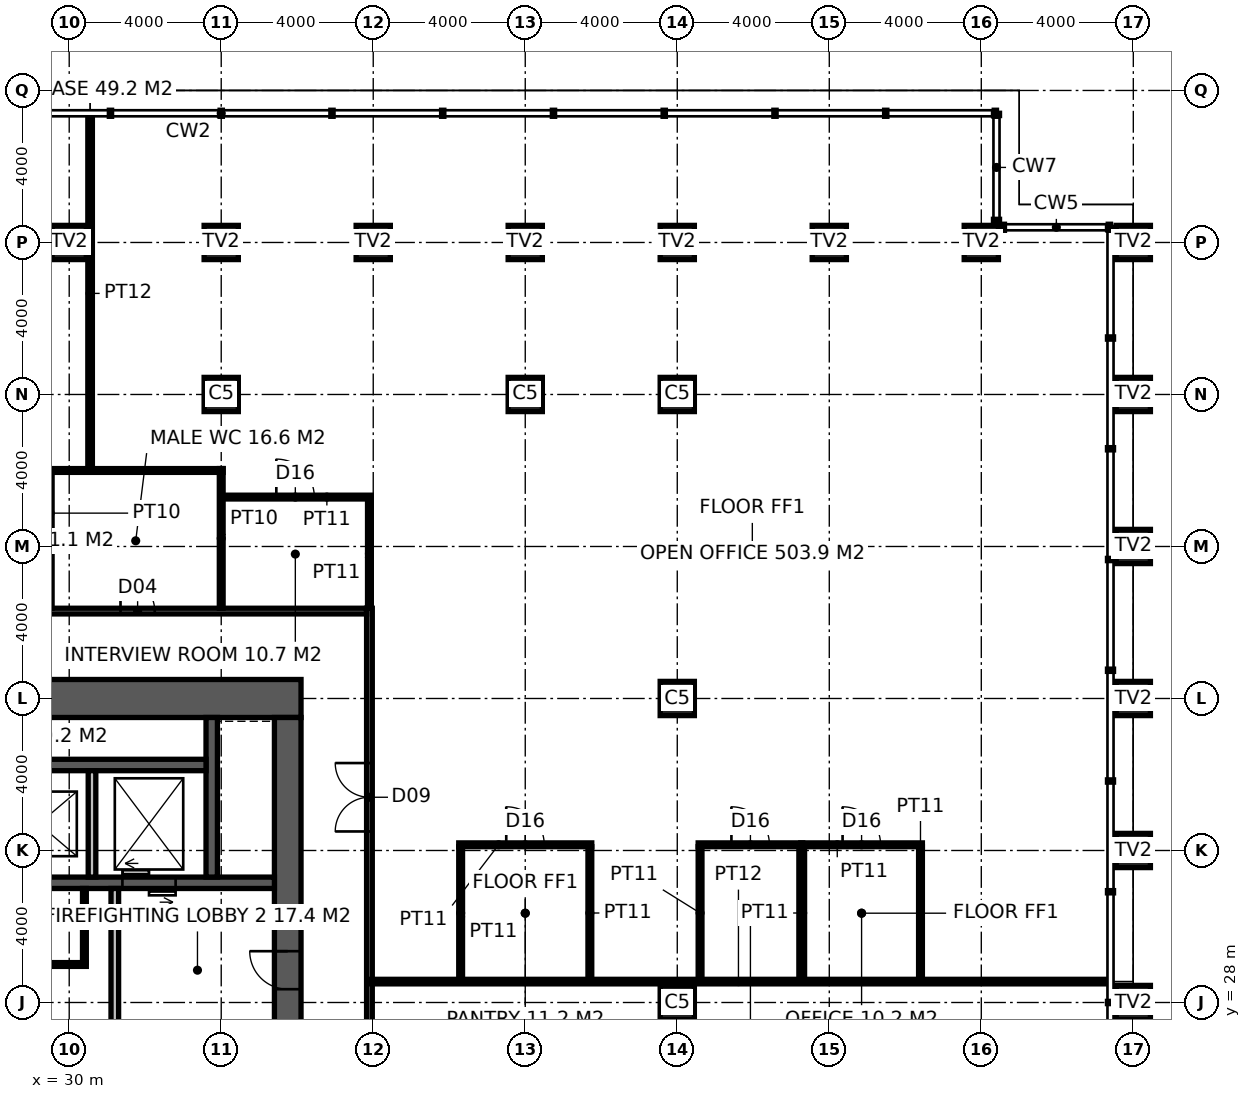
"""IFC4 building model, lengths in metres.
Left out: names, types, materials, properties, quantities, classifications, styles, units other than length and angle.
Written with IfcOpenShell. Run it as: python <this file> out.ifc"""

import sys

from ifc_helpers import new_model, si_unit, direction, frame, frame_2d, origin, origin_2d, place, context, subcontext, project, spatial, rectangle, hollow_rectangle, extrude, element, fill, save


model = new_model("IFC4")
c1 = context("Model", 3, precision=1e-05, world=origin(), true_north=direction((0.0, 1.0)))
c2 = subcontext(c1, "Body", "Model", "MODEL_VIEW")
j1 = project(units=[si_unit("LENGTHUNIT", "METRE"), si_unit("PLANEANGLEUNIT", "RADIAN")], contexts=[c1])
p1 = place(None, origin())
s1 = spatial("IfcSite", under=j1, at=p1, CompositionType="ELEMENT")
p2 = place(p1, origin())
s2 = spatial("IfcBuilding", under=s1, at=p2, CompositionType="ELEMENT")
p3 = place(p2, frame((0.0, 0.0, 105.4)))
s3 = spatial("IfcBuildingStorey", under=s2, at=p3, CompositionType="ELEMENT", Elevation=105.4)
for number, where, z_axis, x_axis in (
    (1, (58.0, 28.0, 0.0), (0.0, 0.0, 1.0), (1.0, 0.0, 0.0)),
    (2, (58.0, 32.0, 0.0), (0.0, 0.0, 1.0), (1.0, 0.0, 0.0)),
    (3, (58.0, 36.0, 0.0), (0.0, 0.0, 1.0), (1.0, 0.0, 0.0)),
    (4, (58.0, 40.0, 0.0), (0.0, 0.0, 1.0), (1.0, 0.0, 0.0)),
    (5, (58.0, 44.0, 0.0), (0.0, 0.0, 1.0), (1.0, 0.0, 0.0)),
    (6, (58.0, 48.0, 0.0), (0.0, 0.0, 1.0), (1.0, 0.0, 0.0)),
    (7, (30.0, 48.0, 0.0), (0.0, 0.0, 1.0), (1.0, 0.0, 0.0)),
    (8, (34.0, 48.0, 0.0), (0.0, 0.0, 1.0), (1.0, 0.0, 0.0)),
    (9, (38.0, 48.0, 0.0), (0.0, 0.0, 1.0), (1.0, 0.0, 0.0)),
    (10, (42.0, 48.0, 0.0), (0.0, 0.0, 1.0), (1.0, 0.0, 0.0)),
    (11, (46.0, 48.0, 0.0), (0.0, 0.0, 1.0), (1.0, 0.0, 0.0)),
    (12, (50.0, 48.0, 0.0), (0.0, 0.0, 1.0), (1.0, 0.0, 0.0)),
    (13, (54.0, 48.0, 0.0), (0.0, 0.0, 1.0), (1.0, 0.0, 0.0)),
):
    element("IfcColumn", number, at=place(p3, frame(where, z_axis=z_axis, x_axis=x_axis)), inside=s3, PredefinedType="USERDEFINED", context=c2, shape_type="SweptSolid", body=[
        extrude(hollow_rectangle(XDim=0.9, YDim=0.9, WallThickness=0.1, at=origin_2d()), origin(), (0.0, 0.0, 1.0), 4.0),
    ])
for number, where, z_axis, x_axis in (
    (14, (34.0, 44.0, 0.0), (0.0, 0.0, 1.0), (1.0, 0.0, 0.0)),
    (15, (42.0, 44.0, 0.0), (0.0, 0.0, 1.0), (1.0, 0.0, 0.0)),
    (16, (46.0, 28.0, 0.0), (0.0, 0.0, 1.0), (1.0, 0.0, 0.0)),
    (17, (46.0, 36.0, 0.0), (0.0, 0.0, 1.0), (1.0, 0.0, 0.0)),
    (18, (46.0, 44.0, 0.0), (0.0, 0.0, 1.0), (1.0, 0.0, 0.0)),
):
    element("IfcColumn", number, at=place(p3, frame(where, z_axis=z_axis, x_axis=x_axis)), inside=s3, PredefinedType="COLUMN", context=c2, shape_type="SweptSolid", body=[
        extrude(hollow_rectangle(XDim=0.9, YDim=0.9, WallThickness=0.1, at=origin_2d()), origin(), (0.0, 0.0, 1.0), 4.0),
    ])
p4 = place(p3, frame((18.5, 36.0, -0.15), z_axis=(0.0, 0.0, 1.0), x_axis=(1.0, 0.0, 0.0)))
e19 = element("IfcWall", 19, at=p4, inside=s3, PredefinedType="SHEAR", context=c2, shape_type="SweptSolid", body=[
    extrude(rectangle(XDim=17.6, YDim=1.0, at=frame_2d((8.8, 0.0))), origin(), (0.0, 0.0, 1.0), 4.0),
])
p5 = place(p3, frame((35.75, 18.5, -0.15), z_axis=(0.0, 0.0, 1.0), x_axis=(0.0, 1.0, 0.0)))
e20 = element("IfcWall", 20, at=p5, inside=s3, PredefinedType="SHEAR", context=c2, shape_type="SweptSolid", body=[
    extrude(rectangle(XDim=17.0, YDim=0.7, at=frame_2d((8.5, 0.0))), origin(), (0.0, 0.0, 1.0), 4.0),
])
p6 = place(p5, frame((9.85, 0.0, 0.15)))
e21 = element("IfcOpeningElement", 21, at=p6, cuts=e20, PredefinedType="OPENING", context=c2, shape_type="SweptSolid", body=[
    extrude(rectangle(XDim=1.0, YDim=2.2, at=frame_2d((0.5, 1.1))), frame((0.0, 0.36, 0.0), z_axis=(0.0, -1.0, 0.0), x_axis=(1.0, 0.0, 0.0)), (0.0, 0.0, 1.0), 0.72),
])
p7 = place(p3, frame((24.15, 31.15, -0.15), z_axis=(0.0, 0.0, 1.0), x_axis=(1.0, 0.0, 0.0)))
e22 = element("IfcWall", 22, at=p7, inside=s3, PredefinedType="SHEAR", context=c2, shape_type="SweptSolid", body=[
    extrude(rectangle(XDim=11.25, YDim=0.3, at=frame_2d((5.625, 0.0))), origin(), (0.0, 0.0, 1.0), 4.0),
])
p8 = place(p7, frame((7.25, 0.0, 0.15)))
e23 = element("IfcOpeningElement", 23, at=p8, cuts=e22, PredefinedType="OPENING", context=c2, shape_type="SweptSolid", body=[
    extrude(rectangle(XDim=1.4, YDim=2.4, at=frame_2d((0.7, 1.2))), frame((0.0, 0.16, 0.0), z_axis=(0.0, -1.0, 0.0), x_axis=(1.0, 0.0, 0.0)), (0.0, 0.0, 1.0), 0.32),
])
p9 = place(p3, frame((33.75, 31.3, -0.15), z_axis=(0.0, 0.0, 1.0), x_axis=(0.0, 1.0, 0.0)))
e24 = element("IfcWall", 24, at=p9, inside=s3, PredefinedType="SHEAR", context=c2, shape_type="SweptSolid", body=[
    extrude(rectangle(XDim=4.2, YDim=0.3, at=frame_2d((2.1, 0.0))), origin(), (0.0, 0.0, 1.0), 4.0),
])
p10 = place(p3, frame((25.0, 34.25, -0.15), z_axis=(0.0, 0.0, 1.0), x_axis=(1.0, 0.0, 0.0)))
e25 = element("IfcWall", 25, at=p10, inside=s3, PredefinedType="SHEAR", context=c2, shape_type="SweptSolid", body=[
    extrude(rectangle(XDim=8.6, YDim=0.3, at=frame_2d((4.3, 0.0))), origin(), (0.0, 0.0, 1.0), 4.0),
])
p11 = place(p3, frame((30.6, 31.3, -0.15), z_axis=(0.0, 0.0, 1.0), x_axis=(0.0, 1.0, 0.0)))
e26 = element("IfcWall", 26, at=p11, inside=s3, PredefinedType="SOLIDWALL", context=c2, shape_type="SweptSolid", body=[
    extrude(rectangle(XDim=2.8, YDim=0.2, at=frame_2d((1.4, 0.0))), origin(), (0.0, 0.0, 1.0), 4.0),
])
p12 = place(p3, frame((31.2, 26.7, 0.0), z_axis=(0.0, 0.0, 1.0), x_axis=(0.0, 1.0, 0.0)))
e27 = element("IfcWall", 27, at=p12, inside=s3, PredefinedType="SOLIDWALL", context=c2, shape_type="SweptSolid", body=[
    extrude(rectangle(XDim=4.3, YDim=0.2, at=frame_2d((2.15, 0.0))), origin(), (0.0, 0.0, 1.0), 3.85),
])
p13 = place(p3, frame((25.75, 29.0, 0.0), z_axis=(0.0, 0.0, 1.0), x_axis=(1.0, 0.0, 0.0)))
e28 = element("IfcWall", 28, at=p13, inside=s3, PredefinedType="PARTITIONING", context=c2, shape_type="SweptSolid", body=[
    extrude(rectangle(XDim=4.7, YDim=0.1, at=frame_2d((2.35, 0.0))), origin(), (0.0, 0.0, 1.0), 3.85),
])
p14 = place(p13, frame((1.85, 0.0, 0.0)))
e29 = element("IfcOpeningElement", 29, at=p14, cuts=e28, PredefinedType="OPENING", context=c2, shape_type="SweptSolid", body=[
    extrude(rectangle(XDim=1.0, YDim=2.2, at=frame_2d((0.5, 1.1))), frame((0.0, 0.06, 0.0), z_axis=(0.0, -1.0, 0.0), x_axis=(1.0, 0.0, 0.0)), (0.0, 0.0, 1.0), 0.12),
])
p15 = place(p3, frame((30.4, 29.05, 0.0), z_axis=(0.0, 0.0, 1.0), x_axis=(0.0, 1.0, 0.0)))
e30 = element("IfcWall", 30, at=p15, inside=s3, PredefinedType="PARTITIONING", context=c2, shape_type="SweptSolid", body=[
    extrude(rectangle(XDim=1.95, YDim=0.1, at=frame_2d((0.975, 0.0))), origin(), (0.0, 0.0, 1.0), 3.85),
])
p16 = place(p3, frame((37.9, 15.625, 0.0), z_axis=(0.0, 0.0, 1.0), x_axis=(0.0, 1.0, 0.0)))
e31 = element("IfcWall", 31, at=p16, inside=s3, PredefinedType="PARTITIONING", context=c2, shape_type="SweptSolid", body=[
    extrude(rectangle(XDim=22.75, YDim=0.15, at=frame_2d((11.375, 0.0))), origin(), (0.0, 0.0, 1.0), 2.65),
])
p17 = place(p16, frame((3.074, 0.0, 0.0)))
e32 = element("IfcOpeningElement", 32, at=p17, cuts=e31, PredefinedType="OPENING", context=c2, shape_type="SweptSolid", body=[
    extrude(rectangle(XDim=1.8, YDim=2.4, at=frame_2d((0.9, 1.2))), frame((0.0, 0.085, 0.0), z_axis=(0.0, -1.0, 0.0), x_axis=(1.0, 0.0, 0.0)), (0.0, 0.0, 1.0), 0.17),
])
p18 = place(p16, frame((16.876, 0.0, 0.0)))
e33 = element("IfcOpeningElement", 33, at=p18, cuts=e31, PredefinedType="OPENING", context=c2, shape_type="SweptSolid", body=[
    extrude(rectangle(XDim=1.8, YDim=2.4, at=frame_2d((0.9, 1.2))), frame((0.0, 0.085, 0.0), z_axis=(0.0, -1.0, 0.0), x_axis=(1.0, 0.0, 0.0)), (0.0, 0.0, 1.0), 0.17),
])
p19 = place(p16, frame((9.875, 0.0, 0.0)))
e34 = element("IfcOpeningElement", 34, at=p19, cuts=e31, PredefinedType="OPENING", context=c2, shape_type="SweptSolid", body=[
    extrude(rectangle(XDim=1.0, YDim=2.2, at=frame_2d((0.5, 1.1))), frame((0.0, 0.085, 0.0), z_axis=(0.0, -1.0, 0.0), x_axis=(1.0, 0.0, 0.0)), (0.0, 0.0, 1.0), 0.17),
])
p20 = place(p3, frame((15.175, 38.3, 0.0), z_axis=(0.0, 0.0, 1.0), x_axis=(1.0, 0.0, 0.0)))
e35 = element("IfcWall", 35, at=p20, inside=s3, PredefinedType="PARTITIONING", context=c2, shape_type="SweptSolid", body=[
    extrude(rectangle(XDim=22.65, YDim=0.15, at=frame_2d((11.325, 0.0))), origin(), (0.0, 0.0, 1.0), 3.85),
])
p21 = place(p20, frame((8.575, 0.0, 0.0)))
e36 = element("IfcOpeningElement", 36, at=p21, cuts=e35, PredefinedType="OPENING", context=c2, shape_type="SweptSolid", body=[
    extrude(rectangle(XDim=0.9, YDim=2.1, at=frame_2d((0.45, 1.05))), frame((0.0, 0.085, 0.0), z_axis=(0.0, -1.0, 0.0), x_axis=(1.0, 0.0, 0.0)), (0.0, 0.0, 1.0), 0.17),
])
p22 = place(p20, frame((12.325, 0.0, 0.0)))
e37 = element("IfcOpeningElement", 37, at=p22, cuts=e35, PredefinedType="OPENING", context=c2, shape_type="SweptSolid", body=[
    extrude(rectangle(XDim=1.0, YDim=2.1, at=frame_2d((0.5, 1.05))), frame((0.0, 0.085, 0.0), z_axis=(0.0, -1.0, 0.0), x_axis=(1.0, 0.0, 0.0)), (0.0, 0.0, 1.0), 0.17),
])
p23 = place(p20, frame((16.175, 0.0, 0.0)))
e38 = element("IfcOpeningElement", 38, at=p23, cuts=e35, PredefinedType="OPENING", context=c2, shape_type="SweptSolid", body=[
    extrude(rectangle(XDim=0.9, YDim=2.1, at=frame_2d((0.45, 1.05))), frame((0.0, 0.085, 0.0), z_axis=(0.0, -1.0, 0.0), x_axis=(1.0, 0.0, 0.0)), (0.0, 0.0, 1.0), 0.17),
])
p24 = place(p3, frame((34.0, 38.375, 0.0), z_axis=(0.0, 0.0, 1.0), x_axis=(0.0, 1.0, 0.0)))
e39 = element("IfcWall", 39, at=p24, inside=s3, PredefinedType="PARTITIONING", context=c2, shape_type="SweptSolid", body=[
    extrude(rectangle(XDim=3.675, YDim=0.1, at=frame_2d((1.837, 0.0))), origin(), (0.0, 0.0, 1.0), 2.95),
])
p25 = place(p3, frame((21.95, 42.0, 0.0), z_axis=(0.0, 0.0, 1.0), x_axis=(1.0, 0.0, 0.0)))
e40 = element("IfcWall", 40, at=p25, inside=s3, PredefinedType="PARTITIONING", context=c2, shape_type="SweptSolid", body=[
    extrude(rectangle(XDim=12.1, YDim=0.1, at=frame_2d((6.05, 0.0))), origin(), (0.0, 0.0, 1.0), 3.85),
])
p26 = place(p3, frame((37.9, 28.55, 0.0), z_axis=(0.0, 0.0, 1.0), x_axis=(1.0, 0.0, 0.0)))
e41 = element("IfcWall", 41, at=p26, inside=s3, PredefinedType="PARTITIONING", context=c2, shape_type="SweptSolid", body=[
    extrude(rectangle(XDim=19.42, YDim=0.12, at=frame_2d((9.71, 0.0))), origin(), (0.0, 0.0, 1.0), 2.65),
])
p27 = place(p3, frame((30.55, 42.0, 0.0), z_axis=(0.0, 0.0, 1.0), x_axis=(0.0, 1.0, 0.0)))
e42 = element("IfcWall", 42, at=p27, inside=s3, PredefinedType="PARTITIONING", context=c2, shape_type="SweptSolid", body=[
    extrude(rectangle(XDim=9.32, YDim=0.12, at=frame_2d((4.66, 0.0))), origin(), (0.0, 0.0, 1.0), 3.85),
])
p28 = place(p3, frame((40.25, 32.15, 0.0), z_axis=(0.0, 0.0, 1.0), x_axis=(1.0, 0.0, 0.0)))
e43 = element("IfcWall", 43, at=p28, inside=s3, PredefinedType="PARTITIONING", context=c2, shape_type="SweptSolid", body=[
    extrude(rectangle(XDim=3.5, YDim=0.1, at=frame_2d((1.75, 0.0))), origin(), (0.0, 0.0, 1.0), 2.85),
])
p29 = place(p28, frame((1.25, 0.0, 0.0)))
e44 = element("IfcOpeningElement", 44, at=p29, cuts=e43, PredefinedType="OPENING", context=c2, shape_type="SweptSolid", body=[
    extrude(rectangle(XDim=1.0, YDim=2.2, at=frame_2d((0.5, 1.1))), frame((0.0, 0.06, 0.0), z_axis=(0.0, -1.0, 0.0), x_axis=(1.0, 0.0, 0.0)), (0.0, 0.0, 1.0), 0.12),
])
p30 = place(p3, frame((46.55, 32.15, 0.0), z_axis=(0.0, 0.0, 1.0), x_axis=(1.0, 0.0, 0.0)))
e45 = element("IfcWall", 45, at=p30, inside=s3, PredefinedType="PARTITIONING", context=c2, shape_type="SweptSolid", body=[
    extrude(rectangle(XDim=2.75, YDim=0.1, at=frame_2d((1.375, 0.0))), origin(), (0.0, 0.0, 1.0), 2.85),
])
p31 = place(p30, frame((0.875, 0.0, 0.0)))
e46 = element("IfcOpeningElement", 46, at=p31, cuts=e45, PredefinedType="OPENING", context=c2, shape_type="SweptSolid", body=[
    extrude(rectangle(XDim=1.0, YDim=2.2, at=frame_2d((0.5, 1.1))), frame((0.0, 0.06, 0.0), z_axis=(0.0, -1.0, 0.0), x_axis=(1.0, 0.0, 0.0)), (0.0, 0.0, 1.0), 0.12),
])
p32 = place(p3, frame((49.25, 32.15, 0.0), z_axis=(0.0, 0.0, 1.0), x_axis=(1.0, 0.0, 0.0)))
e47 = element("IfcWall", 47, at=p32, inside=s3, PredefinedType="PARTITIONING", context=c2, shape_type="SweptSolid", body=[
    extrude(rectangle(XDim=3.2, YDim=0.1, at=frame_2d((1.6, 0.0))), origin(), (0.0, 0.0, 1.0), 2.85),
])
p33 = place(p32, frame((1.1, 0.0, 0.0)))
e48 = element("IfcOpeningElement", 48, at=p33, cuts=e47, PredefinedType="OPENING", context=c2, shape_type="SweptSolid", body=[
    extrude(rectangle(XDim=1.0, YDim=2.2, at=frame_2d((0.5, 1.1))), frame((0.0, 0.06, 0.0), z_axis=(0.0, -1.0, 0.0), x_axis=(1.0, 0.0, 0.0)), (0.0, 0.0, 1.0), 0.12),
])
p34 = place(p3, frame((34.05, 41.3, 0.0), z_axis=(0.0, 0.0, 1.0), x_axis=(1.0, 0.0, 0.0)))
e49 = element("IfcWall", 49, at=p34, inside=s3, PredefinedType="PARTITIONING", context=c2, shape_type="SweptSolid", body=[
    extrude(rectangle(XDim=3.9, YDim=0.1, at=frame_2d((1.95, 0.0))), origin(), (0.0, 0.0, 1.0), 3.85),
])
p35 = place(p34, frame((1.4, 0.0, 0.0)))
e50 = element("IfcOpeningElement", 50, at=p35, cuts=e49, PredefinedType="OPENING", context=c2, shape_type="SweptSolid", body=[
    extrude(rectangle(XDim=1.0, YDim=2.2, at=frame_2d((0.5, 1.1))), frame((0.0, 0.06, 0.0), z_axis=(0.0, -1.0, 0.0), x_axis=(1.0, 0.0, 0.0)), (0.0, 0.0, 1.0), 0.12),
])
p36 = place(p3, frame((37.9, 38.375, 0.0), z_axis=(0.0, 0.0, 1.0), x_axis=(0.0, 1.0, 0.0)))
e51 = element("IfcWall", 51, at=p36, inside=s3, PredefinedType="PARTITIONING", context=c2, shape_type="SweptSolid", body=[
    extrude(rectangle(XDim=2.875, YDim=0.1, at=frame_2d((1.438, 0.0))), origin(), (0.0, 0.0, 1.0), 2.65),
])
for number, where, z_axis, x_axis in (
    (52, (40.3, 28.61, 0.0), (0.0, 0.0, 1.0), (0.0, 1.0, 0.0)),
    (53, (43.7, 28.61, 0.0), (0.0, 0.0, 1.0), (0.0, 1.0, 0.0)),
    (54, (46.6, 28.61, 0.0), (0.0, 0.0, 1.0), (0.0, 1.0, 0.0)),
    (55, (49.25, 28.61, 0.0), (0.0, 0.0, 1.0), (0.0, 1.0, 0.0)),
    (56, (49.3, 28.61, 0.0), (0.0, 0.0, 1.0), (0.0, 1.0, 0.0)),
    (57, (52.4, 28.61, 0.0), (0.0, 0.0, 1.0), (0.0, 1.0, 0.0)),
):
    element("IfcWall", number, at=place(p3, frame(where, z_axis=z_axis, x_axis=x_axis)), inside=s3, PredefinedType="PARTITIONING", context=c2, shape_type="SweptSolid", body=[
        extrude(rectangle(XDim=3.49, YDim=0.1, at=frame_2d((1.745, 0.0))), origin(), (0.0, 0.0, 1.0), 3.85),
    ])
p37 = place(p6, origin())
e58 = element("IfcDoor", 58, at=p37, inside=s3, OperationType="SINGLE_SWING_RIGHT", PredefinedType="DOOR", context=c2, shape_type="SweptSolid", body=[
    extrude(rectangle(XDim=1.0, YDim=2.2, at=frame_2d((0.5, 1.1))), frame((0.0, 0.025, 0.0), z_axis=(0.0, -1.0, 0.0), x_axis=(1.0, 0.0, 0.0)), (0.0, 0.0, 1.0), 0.05),
])
fill(e21, e58)
p38 = place(p23, origin())
e59 = element("IfcDoor", 59, at=p38, inside=s3, OperationType="SINGLE_SWING_LEFT", PredefinedType="DOOR", context=c2, shape_type="SweptSolid", body=[
    extrude(rectangle(XDim=0.9, YDim=2.1, at=frame_2d((0.45, 1.05))), frame((0.0, 0.025, 0.0), z_axis=(0.0, -1.0, 0.0), x_axis=(1.0, 0.0, 0.0)), (0.0, 0.0, 1.0), 0.05),
])
fill(e38, e59)
p39 = place(p18, origin())
e60 = element("IfcDoor", 60, at=p39, inside=s3, OperationType="DOUBLE_DOOR_DOUBLE_SWING", PredefinedType="DOOR", context=c2, shape_type="SweptSolid", body=[
    extrude(rectangle(XDim=1.8, YDim=2.4, at=frame_2d((0.9, 1.2))), frame((0.0, 0.025, 0.0), z_axis=(0.0, -1.0, 0.0), x_axis=(1.0, 0.0, 0.0)), (0.0, 0.0, 1.0), 0.05),
])
fill(e33, e60)
p40 = place(p35, origin())
e61 = element("IfcDoor", 61, at=p40, inside=s3, OperationType="SINGLE_SWING_LEFT", PredefinedType="DOOR", context=c2, shape_type="SweptSolid", body=[
    extrude(rectangle(XDim=1.0, YDim=2.2, at=frame_2d((0.5, 1.1))), frame((0.0, 0.025, 0.0), z_axis=(0.0, -1.0, 0.0), x_axis=(1.0, 0.0, 0.0)), (0.0, 0.0, 1.0), 0.05),
])
fill(e50, e61)
p41 = place(p29, origin())
e62 = element("IfcDoor", 62, at=p41, inside=s3, OperationType="SINGLE_SWING_LEFT", PredefinedType="DOOR", context=c2, shape_type="SweptSolid", body=[
    extrude(rectangle(XDim=1.0, YDim=2.2, at=frame_2d((0.5, 1.1))), frame((0.0, 0.025, 0.0), z_axis=(0.0, -1.0, 0.0), x_axis=(1.0, 0.0, 0.0)), (0.0, 0.0, 1.0), 0.05),
])
fill(e44, e62)
p42 = place(p31, origin())
e63 = element("IfcDoor", 63, at=p42, inside=s3, OperationType="SINGLE_SWING_LEFT", PredefinedType="DOOR", context=c2, shape_type="SweptSolid", body=[
    extrude(rectangle(XDim=1.0, YDim=2.2, at=frame_2d((0.5, 1.1))), frame((0.0, 0.025, 0.0), z_axis=(0.0, -1.0, 0.0), x_axis=(1.0, 0.0, 0.0)), (0.0, 0.0, 1.0), 0.05),
])
fill(e46, e63)
p43 = place(p33, origin())
e64 = element("IfcDoor", 64, at=p43, inside=s3, OperationType="SINGLE_SWING_LEFT", PredefinedType="DOOR", context=c2, shape_type="SweptSolid", body=[
    extrude(rectangle(XDim=1.0, YDim=2.2, at=frame_2d((0.5, 1.1))), frame((0.0, 0.025, 0.0), z_axis=(0.0, -1.0, 0.0), x_axis=(1.0, 0.0, 0.0)), (0.0, 0.0, 1.0), 0.05),
])
fill(e48, e64)
p44 = place(p8, origin())
e65 = element("IfcDoor", 65, at=p44, inside=s3, OperationType="DOUBLE_DOOR_SLIDING", PredefinedType="DOOR", context=c2, shape_type="SweptSolid", body=[
    extrude(rectangle(XDim=1.4, YDim=2.4, at=frame_2d((0.7, 1.2))), frame((0.0, 0.025, 0.0), z_axis=(0.0, -1.0, 0.0), x_axis=(1.0, 0.0, 0.0)), (0.0, 0.0, 1.0), 0.05),
])
fill(e23, e65)
save(model, sys.argv[1])
